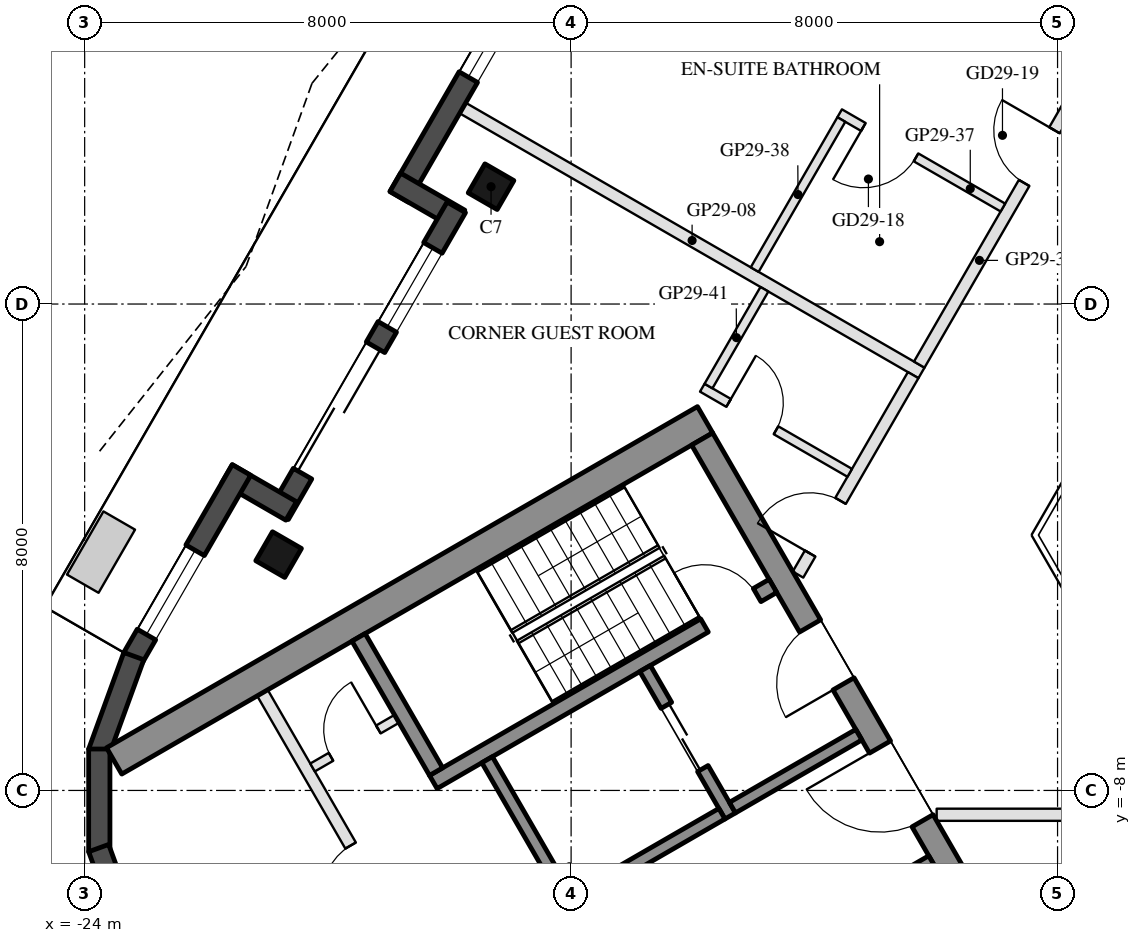
"""IFC4 building model, lengths in metres.
Left out: names, types, materials, properties, quantities, classifications, styles, units other than length and angle.
Written with IfcOpenShell. Run it as: python <this file> out.ifc"""

import sys

from ifc_helpers import new_model, si_unit, direction, frame, frame_2d, origin, origin_2d, place, context, subcontext, project, spatial, rectangle, hollow_rectangle, extrude, boolean, halfspace, element, fill, save


model = new_model("IFC4")
c1 = context("Model", 3, precision=1e-05, world=origin(), true_north=direction((0.0, 1.0)))
c2 = subcontext(c1, "Body", "Model", "MODEL_VIEW")
j1 = project(units=[si_unit("LENGTHUNIT", "METRE"), si_unit("PLANEANGLEUNIT", "RADIAN")], contexts=[c1])
p1 = place(None, origin())
s1 = spatial("IfcSite", under=j1, at=p1, CompositionType="ELEMENT")
p2 = place(p1, origin())
s2 = spatial("IfcBuilding", under=s1, at=p2, CompositionType="ELEMENT")
p3 = place(p2, frame((0.0, 0.0, 291.1)))
s3 = spatial("IfcBuildingStorey", under=s2, at=p3, CompositionType="ELEMENT", Elevation=291.1)
p4 = place(p3, frame((-17.317, 1.93, 0.0), z_axis=(0.0, 0.0, 1.0), x_axis=(0.5, 0.866025403784, 0.0)))
e1 = element("IfcColumn", 1, at=p4, inside=s3, PredefinedType="COLUMN", context=c2, shape_type="SweptSolid", body=[
    boolean("DIFFERENCE", extrude(hollow_rectangle(XDim=0.55, YDim=0.55, WallThickness=0.025, at=origin_2d()), origin(), (0.0, 0.0, 1.0), 3.7), halfspace(frame((0.0, 0.0, 0.034), z_axis=(0.0, 0.0, 1.0), x_axis=(1.0, 0.0, 0.0)), True)),
])
p5 = place(p3, frame((-20.81, -4.121, 0.0), z_axis=(0.0, 0.0, 1.0), x_axis=(0.5, 0.866025403784, 0.0)))
e2 = element("IfcColumn", 2, at=p5, inside=s3, PredefinedType="COLUMN", context=c2, shape_type="SweptSolid", body=[
    boolean("DIFFERENCE", extrude(hollow_rectangle(XDim=0.55, YDim=0.55, WallThickness=0.025, at=origin_2d()), origin(), (0.0, 0.0, 1.0), 3.7), halfspace(frame((0.0, 0.0, 0.04), z_axis=(0.0, 0.0, 1.0), x_axis=(1.0, 0.0, 0.0)), True)),
])
p6 = place(p3, frame((-14.434, 9.373, 0.0), z_axis=(0.0, 0.0, 1.0), x_axis=(-0.499999835575, -0.866025498715, 0.0)))
e3 = element("IfcWall", 3, at=p6, inside=s3, PredefinedType="SOLIDWALL", context=c2, shape_type="SweptSolid", body=[
    extrude(rectangle(XDim=8.787, YDim=0.35, at=frame_2d((4.394, 0.0))), origin(), (0.0, 0.0, 1.0), 3.55),
])
p7 = place(p6, frame((1.719, 0.0, 0.0)))
e4 = element("IfcOpeningElement", 4, at=p7, cuts=e3, PredefinedType="OPENING", context=c2, shape_type="SweptSolid", body=[
    extrude(rectangle(XDim=2.4, YDim=2.4, at=frame_2d((1.2, 1.2))), frame((0.0, 0.185, 0.0), z_axis=(0.0, -1.0, 0.0), x_axis=(1.0, 0.0, 0.0)), (0.0, 0.0, 1.0), 0.37),
])
p8 = place(p6, frame((5.013, 0.0, 0.3)))
e5 = element("IfcOpeningElement", 5, at=p8, cuts=e3, PredefinedType="OPENING", context=c2, shape_type="SweptSolid", body=[
    extrude(rectangle(XDim=1.5, YDim=2.65, at=frame_2d((0.75, 1.325))), frame((0.0, 0.185, 0.0), z_axis=(0.0, -1.0, 0.0), x_axis=(1.0, 0.0, 0.0)), (0.0, 0.0, 1.0), 0.37),
])
p9 = place(p3, frame((-18.892, 2.002, 0.0), z_axis=(0.0, 0.0, 1.0), x_axis=(0.866042269935, -0.499970785833, 0.0)))
e6 = element("IfcWall", 6, at=p9, inside=s3, PredefinedType="SOLIDWALL", context=c2, shape_type="SweptSolid", body=[
    extrude(rectangle(XDim=1.22, YDim=0.35, at=frame_2d((0.61, 0.0))), origin(), (0.0, 0.0, 1.0), 3.55),
])
p10 = place(p3, frame((-17.888, 1.59, 0.0), z_axis=(0.0, 0.0, 1.0), x_axis=(-0.499987198161, -0.866032794804, 0.0)))
e7 = element("IfcWall", 7, at=p10, inside=s3, PredefinedType="SOLIDWALL", context=c2, shape_type="SweptSolid", body=[
    extrude(rectangle(XDim=5.827, YDim=0.35, at=frame_2d((2.914, 0.0))), origin(), (0.0, 0.0, 1.0), 3.55),
])
p11 = place(p10, frame((2.657, 0.0, 0.0)))
e8 = element("IfcOpeningElement", 8, at=p11, cuts=e7, PredefinedType="OPENING", context=c2, shape_type="SweptSolid", body=[
    extrude(rectangle(XDim=2.4, YDim=2.4, at=frame_2d((1.2, 1.2))), frame((0.0, 0.185, 0.0), z_axis=(0.0, -1.0, 0.0), x_axis=(1.0, 0.0, 0.0)), (0.0, 0.0, 1.0), 0.37),
])
p12 = place(p10, frame((0.77, 0.0, 0.3)))
e9 = element("IfcOpeningElement", 9, at=p12, cuts=e7, PredefinedType="OPENING", context=c2, shape_type="SweptSolid", body=[
    extrude(rectangle(XDim=1.5, YDim=2.65, at=frame_2d((0.75, 1.325))), frame((0.0, 0.185, 0.0), z_axis=(0.0, -1.0, 0.0), x_axis=(1.0, 0.0, 0.0)), (0.0, 0.0, 1.0), 0.37),
])
p13 = place(p3, frame((-20.604, -3.403, 0.0), z_axis=(0.0, 0.0, 1.0), x_axis=(-0.866092288191, 0.499884134912, 0.0)))
e10 = element("IfcWall", 10, at=p13, inside=s3, PredefinedType="SOLIDWALL", context=c2, shape_type="SweptSolid", body=[
    extrude(rectangle(XDim=1.22, YDim=0.35, at=frame_2d((0.61, 0.0))), origin(), (0.0, 0.0, 1.0), 3.55),
])
p14 = place(p3, frame((-21.421, -2.729, 0.0), z_axis=(0.0, 0.0, 1.0), x_axis=(-0.500040399856, -0.86600207766, 0.0)))
e11 = element("IfcWall", 11, at=p14, inside=s3, PredefinedType="SOLIDWALL", context=c2, shape_type="SweptSolid", body=[
    extrude(rectangle(XDim=3.567, YDim=0.35, at=frame_2d((1.784, 0.0))), origin(), (0.0, 0.0, 1.0), 3.55),
])
p15 = place(p14, frame((1.525, 0.0, 0.3)))
e12 = element("IfcOpeningElement", 12, at=p15, cuts=e11, PredefinedType="OPENING", context=c2, shape_type="SweptSolid", body=[
    extrude(rectangle(XDim=1.6, YDim=2.65, at=frame_2d((0.8, 1.325))), frame((0.0, 0.185, 0.0), z_axis=(0.0, -1.0, 0.0), x_axis=(1.0, 0.0, 0.0)), (0.0, 0.0, 1.0), 0.37),
])
for number, where, z_axis, x_axis in (
    (13, (-23.192, -5.791, 0.0), (0.0, 0.0, 1.0), (-0.342, -0.94, 0.0)),
    (14, (-23.759, -7.319, 0.0), (0.0, 0.0, 1.0), (0.0, -1.0, 0.0)),
    (15, (-23.77, -8.948, 0.0), (0.0, 0.0, 1.0), (0.342, -0.94, 0.0)),
):
    element("IfcWall", number, at=place(p3, frame(where, z_axis=z_axis, x_axis=x_axis)), inside=s3, PredefinedType="SOLIDWALL", context=c2, shape_type="SweptSolid", body=[
        extrude(rectangle(XDim=1.689, YDim=0.35, at=frame_2d((0.845, 0.0))), origin(), (0.0, 0.0, 1.0), 3.55),
    ])
p16 = place(p3, frame((-13.797, -1.903, 0.0), z_axis=(0.0, 0.0, 1.0), x_axis=(-0.866025449148, -0.499999921427, 0.0)))
e16 = element("IfcWall", 16, at=p16, inside=s3, PredefinedType="SHEAR", context=c2, shape_type="SweptSolid", body=[
    extrude(rectangle(XDim=11.222, YDim=0.5, at=frame_2d((5.611, 0.0))), origin(), (0.0, 0.0, 1.0), 3.5),
])
p17 = place(p3, frame((-13.845, -2.22, 0.0), z_axis=(0.0, 0.0, 1.0), x_axis=(0.500004234368, -0.866022959057, 0.0)))
e17 = element("IfcWall", 17, at=p17, inside=s3, PredefinedType="SHEAR", context=c2, shape_type="SweptSolid", body=[
    extrude(rectangle(XDim=10.0, YDim=0.4, at=frame_2d((5.0, 0.0))), origin(), (0.0, 0.0, 1.0), 3.5),
])
p18 = place(p17, frame((3.55, 0.0, 0.0)))
e18 = element("IfcOpeningElement", 18, at=p18, cuts=e17, PredefinedType="OPENING", context=c2, shape_type="SweptSolid", body=[
    extrude(rectangle(XDim=1.1, YDim=2.1, at=frame_2d((0.55, 1.05))), frame((0.0, 0.21, 0.0), z_axis=(0.0, -1.0, 0.0), x_axis=(1.0, 0.0, 0.0)), (0.0, 0.0, 1.0), 0.42),
])
p19 = place(p17, frame((5.85, 0.0, 0.0)))
e19 = element("IfcOpeningElement", 19, at=p19, cuts=e17, PredefinedType="OPENING", context=c2, shape_type="SweptSolid", body=[
    extrude(rectangle(XDim=1.4, YDim=2.1, at=frame_2d((0.7, 1.05))), frame((0.0, 0.21, 0.0), z_axis=(0.0, -1.0, 0.0), x_axis=(1.0, 0.0, 0.0)), (0.0, 0.0, 1.0), 0.42),
])
p20 = place(p3, frame((-12.681, -4.636, 0.0), z_axis=(0.0, 0.0, 1.0), x_axis=(-0.866021702275, -0.500006411147, 0.0)))
e20 = element("IfcWall", 20, at=p20, inside=s3, PredefinedType="SHEAR", context=c2, shape_type="SweptSolid", body=[
    extrude(rectangle(XDim=6.45, YDim=0.25, at=frame_2d((3.225, 0.0))), origin(), (0.0, 0.0, 1.0), 3.5),
])
p21 = place(p20, frame((0.3, 0.0, 0.0)))
e21 = element("IfcOpeningElement", 21, at=p21, cuts=e20, PredefinedType="OPENING", context=c2, shape_type="SweptSolid", body=[
    extrude(rectangle(XDim=1.0, YDim=2.1, at=frame_2d((0.5, 1.05))), frame((0.0, 0.135, 0.0), z_axis=(0.0, -1.0, 0.0), x_axis=(1.0, 0.0, 0.0)), (0.0, 0.0, 1.0), 0.27),
])
p22 = place(p3, frame((-19.496, -5.482, 0.0), z_axis=(0.0, 0.0, 1.0), x_axis=(0.499990435942, -0.866030925526, 0.0)))
e22 = element("IfcWall", 22, at=p22, inside=s3, PredefinedType="SHEAR", context=c2, shape_type="SweptSolid", body=[
    extrude(rectangle(XDim=2.55, YDim=0.25, at=frame_2d((1.275, 0.0))), origin(), (0.0, 0.0, 1.0), 3.5),
])
p23 = place(p3, frame((-17.381, -7.495, 0.0), z_axis=(0.0, 0.0, 1.0), x_axis=(0.500011755427, -0.866018616679, 0.0)))
e23 = element("IfcWall", 23, at=p23, inside=s3, PredefinedType="SHEAR", context=c2, shape_type="SweptSolid", body=[
    extrude(rectangle(XDim=2.8, YDim=0.2, at=frame_2d((1.4, 0.0))), origin(), (0.0, 0.0, 1.0), 3.5),
])
p24 = place(p3, frame((-14.783, -5.995, 0.0), z_axis=(0.0, 0.0, 1.0), x_axis=(0.49994636267, -0.866056369097, 0.0)))
e24 = element("IfcWall", 24, at=p24, inside=s3, PredefinedType="SHEAR", context=c2, shape_type="SweptSolid", body=[
    extrude(rectangle(XDim=2.8, YDim=0.2, at=frame_2d((1.4, 0.0))), origin(), (0.0, 0.0, 1.0), 3.5),
])
p25 = place(p24, frame((0.7, 0.0, 0.0)))
e25 = element("IfcOpeningElement", 25, at=p25, cuts=e24, PredefinedType="OPENING", context=c2, shape_type="SweptSolid", body=[
    extrude(rectangle(XDim=1.2, YDim=2.1, at=frame_2d((0.6, 1.05))), frame((0.0, 0.11, 0.0), z_axis=(0.0, -1.0, 0.0), x_axis=(1.0, 0.0, 0.0)), (0.0, 0.0, 1.0), 0.22),
])
p26 = place(p3, frame((-13.52, -8.383, 0.0), z_axis=(0.0, 0.0, 1.0), x_axis=(-0.866034573852, -0.49998411664, 0.0)))
e26 = element("IfcWall", 26, at=p26, inside=s3, PredefinedType="SHEAR", context=c2, shape_type="SweptSolid", body=[
    extrude(rectangle(XDim=2.8, YDim=0.2, at=frame_2d((1.4, 0.0))), origin(), (0.0, 0.0, 1.0), 3.5),
])
p27 = place(p3, frame((-11.268, -7.083, 0.0), z_axis=(0.0, 0.0, 1.0), x_axis=(-0.866050077142, -0.499957262057, 0.0)))
e27 = element("IfcWall", 27, at=p27, inside=s3, PredefinedType="SHEAR", context=c2, shape_type="SweptSolid", body=[
    extrude(rectangle(XDim=2.4, YDim=0.2, at=frame_2d((1.2, 0.0))), origin(), (0.0, 0.0, 1.0), 3.5),
])
p28 = place(p3, frame((-10.068, -9.162, 0.0), z_axis=(0.0, 0.0, 1.0), x_axis=(-0.866032725843, -0.499987317609, 0.0)))
e28 = element("IfcWall", 28, at=p28, inside=s3, PredefinedType="SHEAR", context=c2, shape_type="SweptSolid", body=[
    extrude(rectangle(XDim=10.16, YDim=0.2, at=frame_2d((5.08, 0.0))), origin(), (0.0, 0.0, 1.0), 3.5),
])
p29 = place(p28, frame((4.53, 0.0, 0.0)))
e29 = element("IfcOpeningElement", 29, at=p29, cuts=e28, PredefinedType="OPENING", context=c2, shape_type="SweptSolid", body=[
    extrude(rectangle(XDim=0.9, YDim=2.1, at=frame_2d((0.45, 1.05))), frame((0.0, 0.11, 0.0), z_axis=(0.0, -1.0, 0.0), x_axis=(1.0, 0.0, 0.0)), (0.0, 0.0, 1.0), 0.22),
])
p30 = place(p3, frame((-21.076, -6.395, 0.0), z_axis=(0.0, 0.0, 1.0), x_axis=(0.50001468107, -0.866016927499, 0.0)))
e30 = element("IfcWall", 30, at=p30, inside=s3, PredefinedType="PARTITIONING", context=c2, shape_type="SweptSolid", body=[
    extrude(rectangle(XDim=5.4, YDim=0.2, at=frame_2d((2.7, 0.0))), origin(), (0.0, 0.0, 1.0), 3.5),
])
p31 = place(p30, frame((2.9, 0.0, 0.0)))
e31 = element("IfcOpeningElement", 31, at=p31, cuts=e30, PredefinedType="OPENING", context=c2, shape_type="SweptSolid", body=[
    extrude(rectangle(XDim=0.9, YDim=2.1, at=frame_2d((0.45, 1.05))), frame((0.0, 0.11, 0.0), z_axis=(0.0, -1.0, 0.0), x_axis=(1.0, 0.0, 0.0)), (0.0, 0.0, 1.0), 0.22),
])
p32 = place(p3, frame((-18.866, -6.822, 0.0), z_axis=(0.0, 0.0, 1.0), x_axis=(-0.866028054938, -0.499995408039, 0.0)))
e32 = element("IfcWall", 32, at=p32, inside=s3, PredefinedType="PARTITIONING", context=c2, shape_type="SweptSolid", body=[
    extrude(rectangle(XDim=1.6, YDim=0.15, at=frame_2d((0.8, 0.0))), origin(), (0.0, 0.0, 1.0), 3.5),
])
p33 = place(p32, frame((0.35, 0.0, 0.0)))
e33 = element("IfcOpeningElement", 33, at=p33, cuts=e32, PredefinedType="OPENING", context=c2, shape_type="SweptSolid", body=[
    extrude(rectangle(XDim=0.9, YDim=2.1, at=frame_2d((0.45, 1.05))), frame((0.0, 0.085, 0.0), z_axis=(0.0, -1.0, 0.0), x_axis=(1.0, 0.0, 0.0)), (0.0, 0.0, 1.0), 0.17),
])
p34 = place(p3, frame((-17.782, 3.223, 0.0), z_axis=(0.0, 0.0, 1.0), x_axis=(0.866016642396, -0.500015174863, 0.0)))
e34 = element("IfcWall", 34, at=p34, inside=s3, PredefinedType="PARTITIONING", context=c2, shape_type="SweptSolid", body=[
    extrude(rectangle(XDim=8.712, YDim=0.2, at=frame_2d((4.356, 0.0))), origin(), (0.0, 0.0, 1.0), 3.16),
])
p35 = place(p3, frame((-3.588, -8.4, 0.0), z_axis=(0.0, 0.0, 1.0), x_axis=(-1.0, 0.0, 0.0)))
e35 = element("IfcWall", 35, at=p35, inside=s3, PredefinedType="PARTITIONING", context=c2, shape_type="SweptSolid", body=[
    extrude(rectangle(XDim=6.4, YDim=0.2, at=frame_2d((3.2, 0.0))), origin(), (0.0, 0.0, 1.0), 3.05),
])
p36 = place(p35, frame((2.957, 0.0, 0.0)))
e36 = element("IfcOpeningElement", 36, at=p36, cuts=e35, PredefinedType="OPENING", context=c2, shape_type="SweptSolid", body=[
    extrude(rectangle(XDim=1.0, YDim=2.1, at=frame_2d((0.5, 1.05))), frame((0.0, 0.11, 0.0), z_axis=(0.0, -1.0, 0.0), x_axis=(1.0, 0.0, 0.0)), (0.0, 0.0, 1.0), 0.22),
])
p37 = place(p3, frame((-10.275, -0.996, 0.0), z_axis=(0.0, 0.0, 1.0), x_axis=(0.500007539231, 0.866021050964, 0.0)))
e37 = element("IfcWall", 37, at=p37, inside=s3, PredefinedType="PARTITIONING", context=c2, shape_type="SweptSolid", body=[
    extrude(rectangle(XDim=6.598, YDim=0.2, at=frame_2d((3.299, 0.0))), origin(), (0.0, 0.0, 1.0), 3.05),
])
p38 = place(p37, frame((3.45, 0.0, 0.0)))
e38 = element("IfcOpeningElement", 38, at=p38, cuts=e37, PredefinedType="OPENING", context=c2, shape_type="SweptSolid", body=[
    extrude(rectangle(XDim=1.0, YDim=2.1, at=frame_2d((0.5, 1.05))), frame((0.0, 0.11, 0.0), z_axis=(0.0, -1.0, 0.0), x_axis=(1.0, 0.0, 0.0)), (0.0, 0.0, 1.0), 0.22),
])
p39 = place(p3, frame((-8.899, 1.587, 0.0), z_axis=(0.0, 0.0, 1.0), x_axis=(-0.86602952684, 0.49999285859, 0.0)))
e39 = element("IfcWall", 39, at=p39, inside=s3, PredefinedType="PARTITIONING", context=c2, shape_type="SweptSolid", body=[
    extrude(rectangle(XDim=3.1, YDim=0.15, at=frame_2d((1.55, 0.0))), origin(), (0.0, 0.0, 1.0), 3.55),
])
p40 = place(p39, frame((1.65, 0.0, 0.0)))
e40 = element("IfcOpeningElement", 40, at=p40, cuts=e39, PredefinedType="OPENING", context=c2, shape_type="SweptSolid", body=[
    extrude(rectangle(XDim=1.0, YDim=2.1, at=frame_2d((0.5, 1.05))), frame((0.0, 0.085, 0.0), z_axis=(0.0, -1.0, 0.0), x_axis=(1.0, 0.0, 0.0)), (0.0, 0.0, 1.0), 0.17),
])
p41 = place(p3, frame((-11.556, 3.034, 0.0), z_axis=(0.0, 0.0, 1.0), x_axis=(-0.500036373335, -0.866004402611, 0.0)))
e41 = element("IfcWall", 41, at=p41, inside=s3, PredefinedType="PARTITIONING", context=c2, shape_type="SweptSolid", body=[
    extrude(rectangle(XDim=2.85, YDim=0.15, at=frame_2d((1.425, 0.0))), origin(), (0.0, 0.0, 1.0), 3.05),
])
p42 = place(p3, frame((-12.269, -4.45, 0.0), z_axis=(0.0, 0.0, 1.0), x_axis=(0.500055316652, 0.865993464345, 0.0)))
e42 = element("IfcWall", 42, at=p42, inside=s3, PredefinedType="PARTITIONING", context=c2, shape_type="SweptSolid", body=[
    extrude(rectangle(XDim=3.788, YDim=0.2, at=frame_2d((1.894, 0.0))), origin(), (0.0, 0.0, 1.0), 3.05),
])
p43 = place(p42, frame((0.4, 0.0, 0.0)))
e43 = element("IfcOpeningElement", 43, at=p43, cuts=e42, PredefinedType="OPENING", context=c2, shape_type="SweptSolid", body=[
    extrude(rectangle(XDim=1.0, YDim=2.1, at=frame_2d((0.5, 1.05))), frame((0.0, 0.11, 0.0), z_axis=(0.0, -1.0, 0.0), x_axis=(1.0, 0.0, 0.0)), (0.0, 0.0, 1.0), 0.22),
])
p44 = place(p3, frame((-13.843, -1.376, 0.0), z_axis=(0.0, 0.0, 1.0), x_axis=(0.866056369097, -0.49994636267, 0.0)))
e44 = element("IfcWall", 44, at=p44, inside=s3, PredefinedType="PARTITIONING", context=c2, shape_type="SweptSolid", body=[
    extrude(rectangle(XDim=2.8, YDim=0.15, at=frame_2d((1.4, 0.0))), origin(), (0.0, 0.0, 1.0), 3.55),
])
p45 = place(p44, frame((0.5, 0.0, 0.0)))
e45 = element("IfcOpeningElement", 45, at=p45, cuts=e44, PredefinedType="OPENING", context=c2, shape_type="SweptSolid", body=[
    extrude(rectangle(XDim=0.9, YDim=2.1, at=frame_2d((0.45, 1.05))), frame((0.0, 0.085, 0.0), z_axis=(0.0, -1.0, 0.0), x_axis=(1.0, 0.0, 0.0)), (0.0, 0.0, 1.0), 0.17),
])
p46 = place(p3, frame((-12.821, 0.243, 0.0), z_axis=(0.0, 0.0, 1.0), x_axis=(-0.500009850223, -0.866019716681, 0.0)))
e46 = element("IfcWall", 46, at=p46, inside=s3, PredefinedType="PARTITIONING", context=c2, shape_type="SweptSolid", body=[
    extrude(rectangle(XDim=1.838, YDim=0.15, at=frame_2d((0.919, 0.0))), origin(), (0.0, 0.0, 1.0), 3.05),
])
p47 = place(p8, origin())
e47 = element("IfcWindow", 47, at=p47, inside=s3, PartitioningType="SINGLE_PANEL", PredefinedType="WINDOW", context=c2, shape_type="SweptSolid", body=[
    extrude(rectangle(XDim=1.5, YDim=2.65, at=frame_2d((0.75, 1.325))), frame((0.0, 0.03, 0.0), z_axis=(0.0, -1.0, 0.0), x_axis=(1.0, 0.0, 0.0)), (0.0, 0.0, 1.0), 0.06),
])
fill(e5, e47)
p48 = place(p11, frame((2.4, 0.0, 0.0), z_axis=(0.0, 0.0, 1.0), x_axis=(-1.0, 0.0, 0.0)))
e48 = element("IfcDoor", 48, at=p48, inside=s3, OperationType="SLIDING_TO_LEFT", PredefinedType="DOOR", context=c2, shape_type="SweptSolid", body=[
    extrude(rectangle(XDim=2.4, YDim=2.4, at=frame_2d((1.2, 1.2))), frame((0.0, 0.025, 0.0), z_axis=(0.0, -1.0, 0.0), x_axis=(1.0, 0.0, 0.0)), (0.0, 0.0, 1.0), 0.05),
])
fill(e8, e48)
p49 = place(p12, origin())
e49 = element("IfcWindow", 49, at=p49, inside=s3, PartitioningType="SINGLE_PANEL", PredefinedType="WINDOW", context=c2, shape_type="SweptSolid", body=[
    extrude(rectangle(XDim=1.5, YDim=2.65, at=frame_2d((0.75, 1.325))), frame((0.0, 0.03, 0.0), z_axis=(0.0, -1.0, 0.0), x_axis=(1.0, 0.0, 0.0)), (0.0, 0.0, 1.0), 0.06),
])
fill(e9, e49)
p50 = place(p15, origin())
e50 = element("IfcWindow", 50, at=p50, inside=s3, PartitioningType="SINGLE_PANEL", PredefinedType="WINDOW", context=c2, shape_type="SweptSolid", body=[
    extrude(rectangle(XDim=1.6, YDim=2.65, at=frame_2d((0.8, 1.325))), frame((0.0, 0.03, 0.0), z_axis=(0.0, -1.0, 0.0), x_axis=(1.0, 0.0, 0.0)), (0.0, 0.0, 1.0), 0.06),
])
fill(e12, e50)
p51 = place(p25, origin())
e51 = element("IfcDoor", 51, at=p51, inside=s3, OperationType="DOUBLE_DOOR_SLIDING", PredefinedType="DOOR", context=c2, shape_type="SweptSolid", body=[
    extrude(rectangle(XDim=1.2, YDim=2.1, at=frame_2d((0.6, 1.05))), frame((0.0, 0.025, 0.0), z_axis=(0.0, -1.0, 0.0), x_axis=(1.0, 0.0, 0.0)), (0.0, 0.0, 1.0), 0.05),
])
fill(e25, e51)
p52 = place(p33, frame((0.9, 0.0, 0.0), z_axis=(0.0, 0.0, 1.0), x_axis=(-1.0, 0.0, 0.0)))
e52 = element("IfcDoor", 52, at=p52, inside=s3, OperationType="SINGLE_SWING_RIGHT", PredefinedType="DOOR", context=c2, shape_type="SweptSolid", body=[
    extrude(rectangle(XDim=0.9, YDim=2.1, at=frame_2d((0.45, 1.05))), frame((0.0, 0.025, 0.0), z_axis=(0.0, -1.0, 0.0), x_axis=(1.0, 0.0, 0.0)), (0.0, 0.0, 1.0), 0.05),
])
fill(e33, e52)
p53 = place(p31, frame((0.9, 0.0, 0.0), z_axis=(0.0, 0.0, 1.0), x_axis=(-1.0, 0.0, 0.0)))
e53 = element("IfcDoor", 53, at=p53, inside=s3, OperationType="SINGLE_SWING_LEFT", PredefinedType="DOOR", context=c2, shape_type="SweptSolid", body=[
    extrude(rectangle(XDim=0.9, YDim=2.1, at=frame_2d((0.45, 1.05))), frame((0.0, 0.025, 0.0), z_axis=(0.0, -1.0, 0.0), x_axis=(1.0, 0.0, 0.0)), (0.0, 0.0, 1.0), 0.05),
])
fill(e31, e53)
p54 = place(p18, frame((1.1, 0.0, 0.0), z_axis=(0.0, 0.0, 1.0), x_axis=(-1.0, 0.0, 0.0)))
e54 = element("IfcDoor", 54, at=p54, inside=s3, OperationType="SINGLE_SWING_LEFT", PredefinedType="DOOR", context=c2, shape_type="SweptSolid", body=[
    extrude(rectangle(XDim=1.1, YDim=2.1, at=frame_2d((0.55, 1.05))), frame((0.0, 0.025, 0.0), z_axis=(0.0, -1.0, 0.0), x_axis=(1.0, 0.0, 0.0)), (0.0, 0.0, 1.0), 0.05),
])
fill(e18, e54)
p55 = place(p19, frame((1.4, 0.0, 0.0), z_axis=(0.0, 0.0, 1.0), x_axis=(-1.0, 0.0, 0.0)))
e55 = element("IfcDoor", 55, at=p55, inside=s3, OperationType="DOUBLE_DOOR_SINGLE_SWING", PredefinedType="DOOR", context=c2, shape_type="SweptSolid", body=[
    extrude(rectangle(XDim=1.4, YDim=2.1, at=frame_2d((0.7, 1.05))), frame((0.0, 0.025, 0.0), z_axis=(0.0, -1.0, 0.0), x_axis=(1.0, 0.0, 0.0)), (0.0, 0.0, 1.0), 0.05),
])
fill(e19, e55)
p56 = place(p21, frame((1.0, 0.0, 0.0), z_axis=(0.0, 0.0, 1.0), x_axis=(-1.0, 0.0, 0.0)))
e56 = element("IfcDoor", 56, at=p56, inside=s3, OperationType="SINGLE_SWING_LEFT", PredefinedType="DOOR", context=c2, shape_type="SweptSolid", body=[
    extrude(rectangle(XDim=1.0, YDim=2.1, at=frame_2d((0.5, 1.05))), frame((0.0, 0.025, 0.0), z_axis=(0.0, -1.0, 0.0), x_axis=(1.0, 0.0, 0.0)), (0.0, 0.0, 1.0), 0.05),
])
fill(e21, e56)
p57 = place(p40, origin())
e57 = element("IfcDoor", 57, at=p57, inside=s3, OperationType="SINGLE_SWING_RIGHT", PredefinedType="DOOR", context=c2, shape_type="SweptSolid", body=[
    extrude(rectangle(XDim=1.0, YDim=2.1, at=frame_2d((0.5, 1.05))), frame((0.0, 0.025, 0.0), z_axis=(0.0, -1.0, 0.0), x_axis=(1.0, 0.0, 0.0)), (0.0, 0.0, 1.0), 0.05),
])
fill(e40, e57)
p58 = place(p38, origin())
e58 = element("IfcDoor", 58, at=p58, inside=s3, OperationType="SINGLE_SWING_RIGHT", PredefinedType="DOOR", context=c2, shape_type="SweptSolid", body=[
    extrude(rectangle(XDim=1.0, YDim=2.1, at=frame_2d((0.5, 1.05))), frame((0.0, 0.025, 0.0), z_axis=(0.0, -1.0, 0.0), x_axis=(1.0, 0.0, 0.0)), (0.0, 0.0, 1.0), 0.05),
])
fill(e38, e58)
p59 = place(p45, origin())
e59 = element("IfcDoor", 59, at=p59, inside=s3, OperationType="SINGLE_SWING_LEFT", PredefinedType="DOOR", context=c2, shape_type="SweptSolid", body=[
    extrude(rectangle(XDim=0.9, YDim=2.1, at=frame_2d((0.45, 1.05))), frame((0.0, 0.025, 0.0), z_axis=(0.0, -1.0, 0.0), x_axis=(1.0, 0.0, 0.0)), (0.0, 0.0, 1.0), 0.05),
])
fill(e45, e59)
p60 = place(p43, origin())
e60 = element("IfcDoor", 60, at=p60, inside=s3, OperationType="SINGLE_SWING_LEFT", PredefinedType="DOOR", context=c2, shape_type="SweptSolid", body=[
    extrude(rectangle(XDim=1.0, YDim=2.1, at=frame_2d((0.5, 1.05))), frame((0.0, 0.025, 0.0), z_axis=(0.0, -1.0, 0.0), x_axis=(1.0, 0.0, 0.0)), (0.0, 0.0, 1.0), 0.05),
])
fill(e43, e60)
save(model, sys.argv[1])
